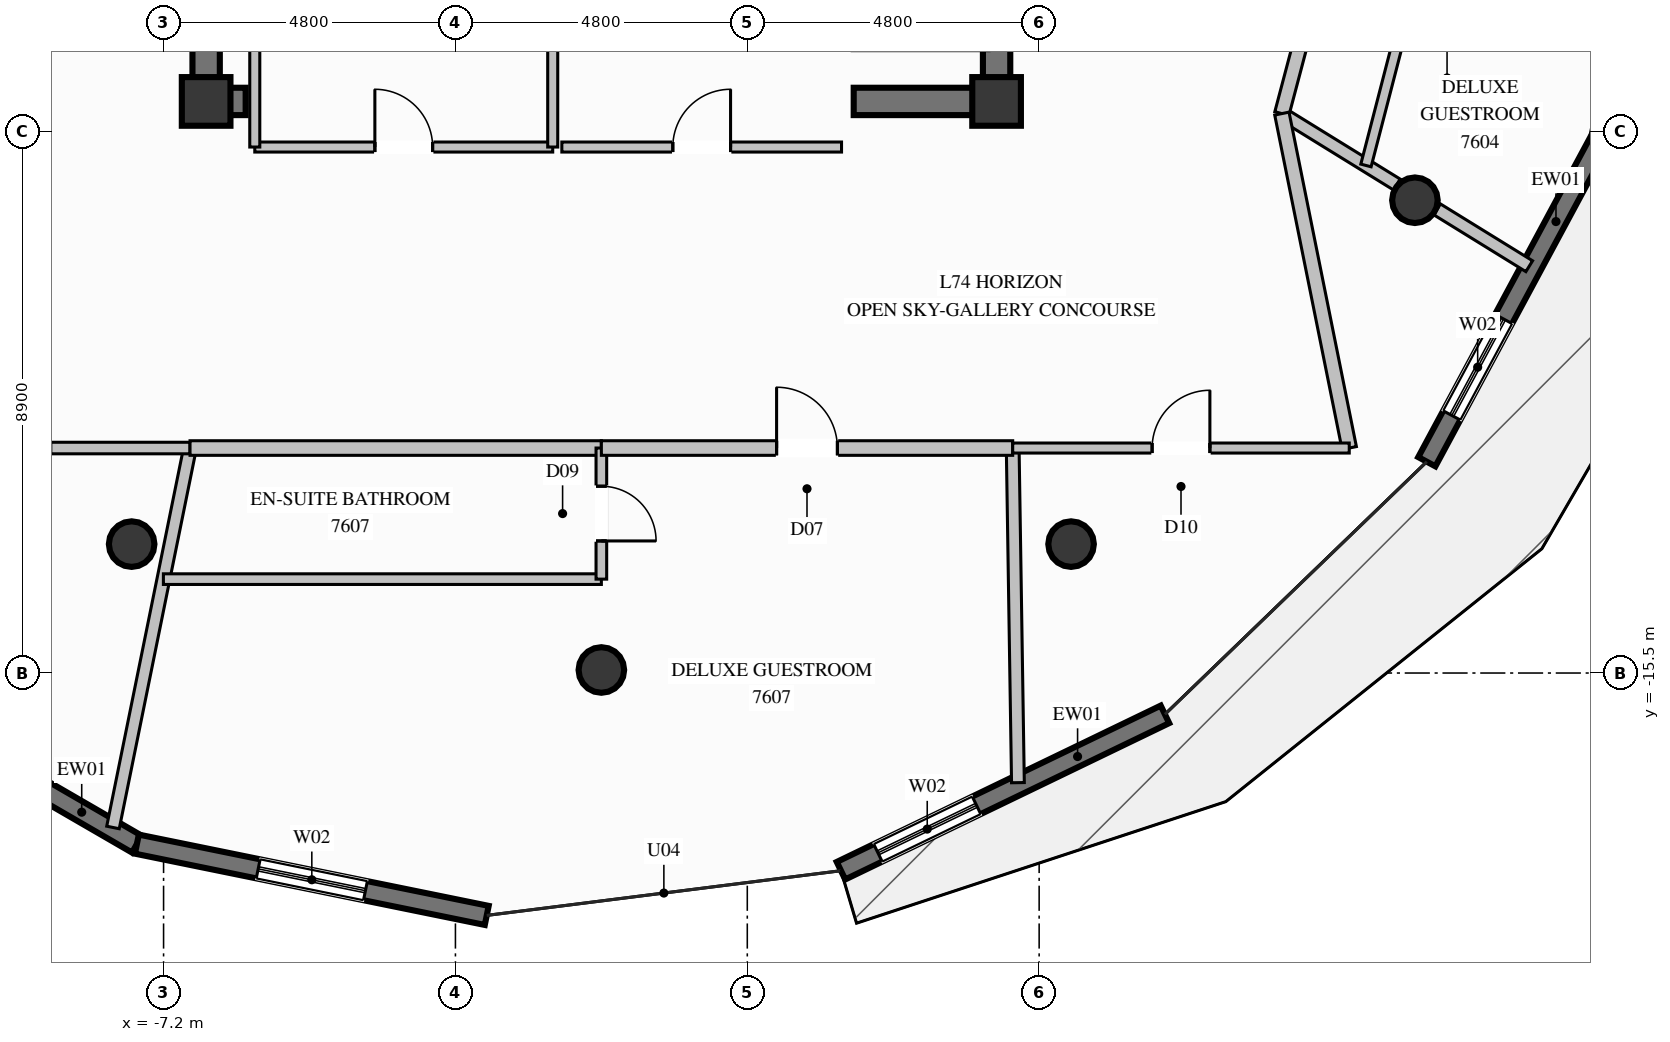
"""IFC4 building model, lengths in metres.
Left out: names, types, materials, properties, quantities, classifications, styles, units other than length and angle.
Written with IfcOpenShell. Run it as: python <this file> out.ifc"""

import sys

from ifc_helpers import new_model, si_unit, direction, frame, frame_2d, origin, origin_2d, place, context, subcontext, project, spatial, rectangle, circle, extrude, element, fill, save


model = new_model("IFC4")
c1 = context("Model", 3, precision=1e-05, world=origin(), true_north=direction((0.0, 1.0)))
c2 = subcontext(c1, "Body", "Model", "MODEL_VIEW")
j1 = project(units=[si_unit("LENGTHUNIT", "METRE"), si_unit("PLANEANGLEUNIT", "RADIAN")], contexts=[c1])
p1 = place(None, origin())
s1 = spatial("IfcSite", under=j1, at=p1, CompositionType="ELEMENT")
p2 = place(p1, origin())
s2 = spatial("IfcBuilding", under=s1, at=p2, CompositionType="ELEMENT")
p3 = place(p2, frame((0.0, 0.0, 285.8)))
s3 = spatial("IfcBuildingStorey", under=s2, at=p3, CompositionType="ELEMENT", Elevation=285.8)
for number, where, z_axis, x_axis in (
    (1, (-6.5, -6.1, 0.0), (0.0, 0.0, 1.0), (1.0, 0.0, 0.0)),
    (2, (6.5, -6.1, 0.0), (0.0, 0.0, 1.0), (1.0, 0.0, 0.0)),
):
    element("IfcColumn", number, at=place(p3, frame(where, z_axis=z_axis, x_axis=x_axis)), inside=s3, PredefinedType="COLUMN", context=c2, shape_type="SweptSolid", body=[
        extrude(rectangle(XDim=0.8, YDim=0.8, at=origin_2d()), origin(), (0.0, 0.0, 1.0), 3.8),
    ])
p4 = place(p3, frame((-6.275, -6.1, 0.0), z_axis=(0.0, 0.0, 1.0), x_axis=(1.0, 0.0, 0.0)))
e3 = element("IfcWall", 3, at=p4, inside=s3, PredefinedType="SHEAR", context=c2, shape_type="SweptSolid", body=[
    extrude(rectangle(XDim=0.425, YDim=0.45, at=frame_2d((0.212, 0.0))), origin(), (0.0, 0.0, 1.0), 3.8),
])
p5 = place(p3, frame((4.15, -6.1, 0.0), z_axis=(0.0, 0.0, 1.0), x_axis=(1.0, 0.0, 0.0)))
e4 = element("IfcWall", 4, at=p5, inside=s3, PredefinedType="SHEAR", context=c2, shape_type="SweptSolid", body=[
    extrude(rectangle(XDim=2.125, YDim=0.45, at=frame_2d((1.062, 0.0))), origin(), (0.0, 0.0, 1.0), 3.8),
])
p6 = place(p3, frame((-6.5, -6.325, 0.0), z_axis=(0.0, 0.0, 1.0), x_axis=(0.0, 1.0, 0.0)))
e5 = element("IfcWall", 5, at=p6, inside=s3, PredefinedType="SHEAR", context=c2, shape_type="SweptSolid", body=[
    extrude(rectangle(XDim=2.975, YDim=0.45, at=frame_2d((1.487, 0.0))), origin(), (0.0, 0.0, 1.0), 3.8),
])
p7 = place(p3, frame((6.5, -6.325, 0.0), z_axis=(0.0, 0.0, 1.0), x_axis=(0.0, 1.0, 0.0)))
e6 = element("IfcWall", 6, at=p7, inside=s3, PredefinedType="SHEAR", context=c2, shape_type="SweptSolid", body=[
    extrude(rectangle(XDim=3.975, YDim=0.45, at=frame_2d((1.987, 0.0))), origin(), (0.0, 0.0, 1.0), 3.8),
])
for number, where, z_axis, x_axis in (
    (7, (-7.725, -13.38, 0.0), (0.0, 0.0, 1.0), (1.0, 0.0, 0.0)),
    (8, (0.0, -15.45, 0.0), (0.0, 0.0, 1.0), (1.0, 0.0, 0.0)),
    (9, (7.725, -13.38, 0.0), (0.0, 0.0, 1.0), (1.0, 0.0, 0.0)),
    (10, (13.38, -7.725, 0.0), (0.0, 0.0, 1.0), (1.0, 0.0, 0.0)),
):
    element("IfcColumn", number, at=place(p3, frame(where, z_axis=z_axis, x_axis=x_axis)), inside=s3, PredefinedType="COLUMN", context=c2, shape_type="SweptSolid", body=[
        extrude(circle(Radius=0.375, at=origin_2d()), origin(), (0.0, 0.0, 1.0), 3.8),
    ])
p8 = place(p3, frame((9.269, -16.18, 0.0), z_axis=(0.0, 0.0, 1.0), x_axis=(-0.900627949964, -0.434590952212, 0.0)))
e11 = element("IfcWall", 11, at=p8, inside=s3, PredefinedType="SOLIDWALL", context=c2, shape_type="SweptSolid", body=[
    extrude(rectangle(XDim=5.916, YDim=0.32, at=frame_2d((2.958, 0.0))), origin(), (0.0, 0.0, 1.0), 3.57),
])
p9 = place(p8, frame((3.441, 0.0, 0.35)))
e12 = element("IfcOpeningElement", 12, at=p9, cuts=e11, PredefinedType="OPENING", context=c2, shape_type="SweptSolid", body=[
    extrude(rectangle(XDim=1.8, YDim=2.6, at=frame_2d((0.9, 1.3))), frame((0.0, 0.17, 0.0), z_axis=(0.0, -1.0, 0.0), x_axis=(1.0, 0.0, 0.0)), (0.0, 0.0, 1.0), 0.34),
])
p10 = place(p3, frame((16.443, -6.694, 0.0), z_axis=(0.0, 0.0, 1.0), x_axis=(-0.4736836628, -0.880695059369, 0.0)))
e13 = element("IfcWall", 13, at=p10, inside=s3, PredefinedType="SOLIDWALL", context=c2, shape_type="SweptSolid", body=[
    extrude(rectangle(XDim=6.053, YDim=0.32, at=frame_2d((3.026, 0.0))), origin(), (0.0, 0.0, 1.0), 3.57),
])
p11 = place(p10, frame((3.388, 0.0, 0.35)))
e14 = element("IfcOpeningElement", 14, at=p11, cuts=e13, PredefinedType="OPENING", context=c2, shape_type="SweptSolid", body=[
    extrude(rectangle(XDim=1.8, YDim=2.6, at=frame_2d((0.9, 1.3))), frame((0.0, 0.17, 0.0), z_axis=(0.0, -1.0, 0.0), x_axis=(1.0, 0.0, 0.0)), (0.0, 0.0, 1.0), 0.34),
])
p12 = place(p3, frame((-7.639, -18.314, 0.0), z_axis=(0.0, 0.0, 1.0), x_axis=(-0.865343391722, 0.501179423363, 0.0)))
e15 = element("IfcWall", 15, at=p12, inside=s3, PredefinedType="SOLIDWALL", context=c2, shape_type="SweptSolid", body=[
    extrude(rectangle(XDim=5.916, YDim=0.32, at=frame_2d((2.958, 0.0))), origin(), (0.0, 0.0, 1.0), 3.57),
])
p13 = place(p12, frame((2.347, 0.0, 0.35)))
e16 = element("IfcOpeningElement", 16, at=p13, cuts=e15, PredefinedType="OPENING", context=c2, shape_type="SweptSolid", body=[
    extrude(rectangle(XDim=1.8, YDim=2.6, at=frame_2d((0.9, 1.3))), frame((0.0, 0.17, 0.0), z_axis=(0.0, -1.0, 0.0), x_axis=(1.0, 0.0, 0.0)), (0.0, 0.0, 1.0), 0.34),
])
p14 = place(p3, frame((-1.885, -19.486, 0.0), z_axis=(0.0, 0.0, 1.0), x_axis=(-0.979875645158, 0.199608917702, 0.0)))
e17 = element("IfcWall", 17, at=p14, inside=s3, PredefinedType="SOLIDWALL", context=c2, shape_type="SweptSolid", body=[
    extrude(rectangle(XDim=5.872, YDim=0.32, at=frame_2d((2.936, 0.0))), origin(), (0.0, 0.0, 1.0), 3.57),
])
p15 = place(p14, frame((2.036, 0.0, 0.35)))
e18 = element("IfcOpeningElement", 18, at=p15, cuts=e17, PredefinedType="OPENING", context=c2, shape_type="SweptSolid", body=[
    extrude(rectangle(XDim=1.8, YDim=2.6, at=frame_2d((0.9, 1.3))), frame((0.0, 0.17, 0.0), z_axis=(0.0, -1.0, 0.0), x_axis=(1.0, 0.0, 0.0)), (0.0, 0.0, 1.0), 0.34),
])
p16 = place(p3, frame((-5.7, -6.85, 0.0), z_axis=(0.0, 0.0, 1.0), x_axis=(1.0, 0.0, 0.0)))
e19 = element("IfcWall", 19, at=p16, inside=s3, PredefinedType="PARTITIONING", context=c2, shape_type="SweptSolid", body=[
    extrude(rectangle(XDim=4.9, YDim=0.165, at=frame_2d((2.45, 0.0))), origin(), (0.0, 0.0, 1.0), 2.655),
])
p17 = place(p16, frame((1.975, 0.0, 0.0)))
e20 = element("IfcOpeningElement", 20, at=p17, cuts=e19, PredefinedType="OPENING", context=c2, shape_type="SweptSolid", body=[
    extrude(rectangle(XDim=0.95, YDim=2.1, at=frame_2d((0.475, 1.05))), frame((0.0, 0.093, 0.0), z_axis=(0.0, -1.0, 0.0), x_axis=(1.0, 0.0, 0.0)), (0.0, 0.0, 1.0), 0.185),
])
p18 = place(p3, frame((-0.8, -6.85, 0.0), z_axis=(0.0, 0.0, 1.0), x_axis=(0.0, 1.0, 0.0)))
e21 = element("IfcWall", 21, at=p18, inside=s3, PredefinedType="PARTITIONING", context=c2, shape_type="SweptSolid", body=[
    extrude(rectangle(XDim=3.35, YDim=0.165, at=frame_2d((1.675, 0.0))), origin(), (0.0, 0.0, 1.0), 3.57),
])
p19 = place(p3, frame((-5.7, -3.5, 0.0), z_axis=(0.0, 0.0, 1.0), x_axis=(0.0, -1.0, 0.0)))
e22 = element("IfcWall", 22, at=p19, inside=s3, PredefinedType="PARTITIONING", context=c2, shape_type="SweptSolid", body=[
    extrude(rectangle(XDim=3.35, YDim=0.165, at=frame_2d((1.675, 0.0))), origin(), (0.0, 0.0, 1.0), 2.655),
])
p20 = place(p3, frame((-0.65, -6.85, 0.0), z_axis=(0.0, 0.0, 1.0), x_axis=(1.0, 0.0, 0.0)))
e23 = element("IfcWall", 23, at=p20, inside=s3, PredefinedType="PARTITIONING", context=c2, shape_type="SweptSolid", body=[
    extrude(rectangle(XDim=4.6, YDim=0.165, at=frame_2d((2.3, 0.0))), origin(), (0.0, 0.0, 1.0), 2.655),
])
p21 = place(p20, frame((1.825, 0.0, 0.0)))
e24 = element("IfcOpeningElement", 24, at=p21, cuts=e23, PredefinedType="OPENING", context=c2, shape_type="SweptSolid", body=[
    extrude(rectangle(XDim=0.95, YDim=2.1, at=frame_2d((0.475, 1.05))), frame((0.0, 0.093, 0.0), z_axis=(0.0, -1.0, 0.0), x_axis=(1.0, 0.0, 0.0)), (0.0, 0.0, 1.0), 0.185),
])
p22 = place(p3, frame((11.192, -6.3, 0.0), z_axis=(0.0, 0.0, 1.0), x_axis=(0.851084090432, -0.525029400142, 0.0)))
e25 = element("IfcWall", 25, at=p22, inside=s3, PredefinedType="PARTITIONING", context=c2, shape_type="SweptSolid", body=[
    extrude(rectangle(XDim=2.221, YDim=0.21, at=frame_2d((1.11, 0.0))), origin(), (0.0, 0.0, 1.0), 3.011),
])
p23 = place(p3, frame((13.745, -7.875, 0.0), z_axis=(0.0, 0.0, 1.0), x_axis=(0.850951244942, -0.52524468463, 0.0)))
e26 = element("IfcWall", 26, at=p23, inside=s3, PredefinedType="PARTITIONING", context=c2, shape_type="SweptSolid", body=[
    extrude(rectangle(XDim=1.78, YDim=0.21, at=frame_2d((0.89, 0.0))), origin(), (0.0, 0.0, 1.0), 3.57),
])
p24 = place(p3, frame((11.192, -6.3, 0.0), z_axis=(0.0, 0.0, 1.0), x_axis=(0.255878192504, 0.966709030992, 0.0)))
e27 = element("IfcWall", 27, at=p24, inside=s3, PredefinedType="PARTITIONING", context=c2, shape_type="SweptSolid", body=[
    extrude(rectangle(XDim=2.802, YDim=0.24, at=frame_2d((1.401, 0.0))), origin(), (0.0, 0.0, 1.0), 3.57),
])
p25 = place(p3, frame((12.575, -7.153, 0.0), z_axis=(0.0, 0.0, 1.0), x_axis=(0.25076020851, 0.968049233163, 0.0)))
e28 = element("IfcWall", 28, at=p25, inside=s3, PredefinedType="PLUMBINGWALL", context=c2, shape_type="SweptSolid", body=[
    extrude(rectangle(XDim=3.147, YDim=0.175, at=frame_2d((1.573, 0.0))), origin(), (0.0, 0.0, 1.0), 3.57),
])
p26 = place(p3, frame((-6.765, -11.8, 0.0), z_axis=(0.0, 0.0, 1.0), x_axis=(-0.198998359894, -0.979999822837, 0.0)))
e29 = element("IfcWall", 29, at=p26, inside=s3, PredefinedType="PARTITIONING", context=c2, shape_type="SweptSolid", body=[
    extrude(rectangle(XDim=6.367, YDim=0.21, at=frame_2d((3.184, 0.0))), origin(), (0.0, 0.0, 1.0), 3.011),
])
p27 = place(p3, frame((-12.3, -11.8, 0.0), z_axis=(0.0, 0.0, 1.0), x_axis=(1.0, 0.0, 0.0)))
e30 = element("IfcWall", 30, at=p27, inside=s3, PredefinedType="PARTITIONING", context=c2, shape_type="SweptSolid", body=[
    extrude(rectangle(XDim=5.535, YDim=0.19, at=frame_2d((2.768, 0.0))), origin(), (0.0, 0.0, 1.0), 3.57),
])
p28 = place(p27, frame((2.293, 0.0, 0.0)))
e31 = element("IfcOpeningElement", 31, at=p28, cuts=e30, PredefinedType="OPENING", context=c2, shape_type="SweptSolid", body=[
    extrude(rectangle(XDim=0.95, YDim=2.1, at=frame_2d((0.475, 1.05))), frame((0.0, 0.105, 0.0), z_axis=(0.0, -1.0, 0.0), x_axis=(1.0, 0.0, 0.0)), (0.0, 0.0, 1.0), 0.21),
])
p29 = place(p3, frame((-6.765, -11.8, 0.0), z_axis=(0.0, 0.0, 1.0), x_axis=(1.0, 0.0, 0.0)))
e32 = element("IfcWall", 32, at=p29, inside=s3, PredefinedType="PARTITIONING", context=c2, shape_type="SweptSolid", body=[
    extrude(rectangle(XDim=6.765, YDim=0.24, at=frame_2d((3.382, 0.0))), origin(), (0.0, 0.0, 1.0), 3.57),
])
p30 = place(p3, frame((-7.203, -13.956, 0.0), z_axis=(0.0, 0.0, 1.0), x_axis=(1.0, 0.0, 0.0)))
e33 = element("IfcWall", 33, at=p30, inside=s3, PredefinedType="PLUMBINGWALL", context=c2, shape_type="SweptSolid", body=[
    extrude(rectangle(XDim=7.203, YDim=0.175, at=frame_2d((3.602, 0.0))), origin(), (0.0, 0.0, 1.0), 3.137),
])
p31 = place(p3, frame((0.0, -11.8, 0.0), z_axis=(0.0, 0.0, 1.0), x_axis=(0.0, -1.0, 0.0)))
e34 = element("IfcWall", 34, at=p31, inside=s3, PredefinedType="PLUMBINGWALL", context=c2, shape_type="SweptSolid", body=[
    extrude(rectangle(XDim=2.156, YDim=0.175, at=frame_2d((1.078, 0.0))), origin(), (0.0, 0.0, 1.0), 3.57),
])
p32 = place(p31, frame((0.628, 0.0, 0.0)))
e35 = element("IfcOpeningElement", 35, at=p32, cuts=e34, PredefinedType="OPENING", context=c2, shape_type="SweptSolid", body=[
    extrude(rectangle(XDim=0.9, YDim=2.1, at=frame_2d((0.45, 1.05))), frame((0.0, 0.098, 0.0), z_axis=(0.0, -1.0, 0.0), x_axis=(1.0, 0.0, 0.0)), (0.0, 0.0, 1.0), 0.195),
])
p33 = place(p3, frame((6.765, -11.8, 0.0), z_axis=(0.0, 0.0, 1.0), x_axis=(0.015659126801, -0.999877388357, 0.0)))
e36 = element("IfcWall", 36, at=p33, inside=s3, PredefinedType="PARTITIONING", context=c2, shape_type="SweptSolid", body=[
    extrude(rectangle(XDim=5.504, YDim=0.21, at=frame_2d((2.752, 0.0))), origin(), (0.0, 0.0, 1.0), 3.57),
])
p34 = place(p3, frame((0.0, -11.8, 0.0), z_axis=(0.0, 0.0, 1.0), x_axis=(1.0, 0.0, 0.0)))
e37 = element("IfcWall", 37, at=p34, inside=s3, PredefinedType="PARTITIONING", context=c2, shape_type="SweptSolid", body=[
    extrude(rectangle(XDim=6.765, YDim=0.24, at=frame_2d((3.382, 0.0))), origin(), (0.0, 0.0, 1.0), 3.57),
])
p35 = place(p34, frame((2.882, 0.0, 0.0)))
e38 = element("IfcOpeningElement", 38, at=p35, cuts=e37, PredefinedType="OPENING", context=c2, shape_type="SweptSolid", body=[
    extrude(rectangle(XDim=1.0, YDim=2.2, at=frame_2d((0.5, 1.1))), frame((0.0, 0.13, 0.0), z_axis=(0.0, -1.0, 0.0), x_axis=(1.0, 0.0, 0.0)), (0.0, 0.0, 1.0), 0.26),
])
p36 = place(p3, frame((12.3, -11.8, 0.0), z_axis=(0.0, 0.0, 1.0), x_axis=(-0.197513428752, 0.980300181303, 0.0)))
e39 = element("IfcWall", 39, at=p36, inside=s3, PredefinedType="PARTITIONING", context=c2, shape_type="SweptSolid", body=[
    extrude(rectangle(XDim=5.611, YDim=0.24, at=frame_2d((2.805, 0.0))), origin(), (0.0, 0.0, 1.0), 3.57),
])
p37 = place(p3, frame((6.765, -11.8, 0.0), z_axis=(0.0, 0.0, 1.0), x_axis=(1.0, 0.0, 0.0)))
e40 = element("IfcWall", 40, at=p37, inside=s3, PredefinedType="PARTITIONING", context=c2, shape_type="SweptSolid", body=[
    extrude(rectangle(XDim=5.535, YDim=0.165, at=frame_2d((2.768, 0.0))), origin(), (0.0, 0.0, 1.0), 3.57),
])
p38 = place(p37, frame((2.293, 0.0, 0.0)))
e41 = element("IfcOpeningElement", 41, at=p38, cuts=e40, PredefinedType="OPENING", context=c2, shape_type="SweptSolid", body=[
    extrude(rectangle(XDim=0.95, YDim=2.1, at=frame_2d((0.475, 1.05))), frame((0.0, 0.093, 0.0), z_axis=(0.0, -1.0, 0.0), x_axis=(1.0, 0.0, 0.0)), (0.0, 0.0, 1.0), 0.185),
])
p39 = place(p9, origin())
e42 = element("IfcWindow", 42, at=p39, inside=s3, PartitioningType="SINGLE_PANEL", PredefinedType="WINDOW", context=c2, shape_type="SweptSolid", body=[
    extrude(rectangle(XDim=1.8, YDim=2.6, at=frame_2d((0.9, 1.3))), frame((0.0, 0.03, 0.0), z_axis=(0.0, -1.0, 0.0), x_axis=(1.0, 0.0, 0.0)), (0.0, 0.0, 1.0), 0.06),
])
fill(e12, e42)
p40 = place(p11, origin())
e43 = element("IfcWindow", 43, at=p40, inside=s3, PartitioningType="SINGLE_PANEL", PredefinedType="WINDOW", context=c2, shape_type="SweptSolid", body=[
    extrude(rectangle(XDim=1.8, YDim=2.6, at=frame_2d((0.9, 1.3))), frame((0.0, 0.03, 0.0), z_axis=(0.0, -1.0, 0.0), x_axis=(1.0, 0.0, 0.0)), (0.0, 0.0, 1.0), 0.06),
])
fill(e14, e43)
p41 = place(p15, origin())
e44 = element("IfcWindow", 44, at=p41, inside=s3, PartitioningType="SINGLE_PANEL", PredefinedType="WINDOW", context=c2, shape_type="SweptSolid", body=[
    extrude(rectangle(XDim=1.8, YDim=2.6, at=frame_2d((0.9, 1.3))), frame((0.0, 0.03, 0.0), z_axis=(0.0, -1.0, 0.0), x_axis=(1.0, 0.0, 0.0)), (0.0, 0.0, 1.0), 0.06),
])
fill(e18, e44)
p42 = place(p17, origin())
e45 = element("IfcDoor", 45, at=p42, inside=s3, OperationType="SINGLE_SWING_LEFT", PredefinedType="DOOR", context=c2, shape_type="SweptSolid", body=[
    extrude(rectangle(XDim=0.95, YDim=2.1, at=frame_2d((0.475, 1.05))), frame((0.0, 0.025, 0.0), z_axis=(0.0, -1.0, 0.0), x_axis=(1.0, 0.0, 0.0)), (0.0, 0.0, 1.0), 0.05),
])
fill(e20, e45)
p43 = place(p21, origin())
e46 = element("IfcDoor", 46, at=p43, inside=s3, OperationType="SINGLE_SWING_RIGHT", PredefinedType="DOOR", context=c2, shape_type="SweptSolid", body=[
    extrude(rectangle(XDim=0.95, YDim=2.1, at=frame_2d((0.475, 1.05))), frame((0.0, 0.025, 0.0), z_axis=(0.0, -1.0, 0.0), x_axis=(1.0, 0.0, 0.0)), (0.0, 0.0, 1.0), 0.05),
])
fill(e24, e46)
p44 = place(p32, origin())
e47 = element("IfcDoor", 47, at=p44, inside=s3, OperationType="SINGLE_SWING_RIGHT", PredefinedType="DOOR", context=c2, shape_type="SweptSolid", body=[
    extrude(rectangle(XDim=0.9, YDim=2.1, at=frame_2d((0.45, 1.05))), frame((0.0, 0.025, 0.0), z_axis=(0.0, -1.0, 0.0), x_axis=(1.0, 0.0, 0.0)), (0.0, 0.0, 1.0), 0.05),
])
fill(e35, e47)
p45 = place(p35, origin())
e48 = element("IfcDoor", 48, at=p45, inside=s3, OperationType="SINGLE_SWING_LEFT", PredefinedType="DOOR", context=c2, shape_type="SweptSolid", body=[
    extrude(rectangle(XDim=1.0, YDim=2.2, at=frame_2d((0.5, 1.1))), frame((0.0, 0.025, 0.0), z_axis=(0.0, -1.0, 0.0), x_axis=(1.0, 0.0, 0.0)), (0.0, 0.0, 1.0), 0.05),
])
fill(e38, e48)
p46 = place(p38, origin())
e49 = element("IfcDoor", 49, at=p46, inside=s3, OperationType="SINGLE_SWING_RIGHT", PredefinedType="DOOR", context=c2, shape_type="SweptSolid", body=[
    extrude(rectangle(XDim=0.95, YDim=2.1, at=frame_2d((0.475, 1.05))), frame((0.0, 0.025, 0.0), z_axis=(0.0, -1.0, 0.0), x_axis=(1.0, 0.0, 0.0)), (0.0, 0.0, 1.0), 0.05),
])
fill(e41, e49)
save(model, sys.argv[1])
